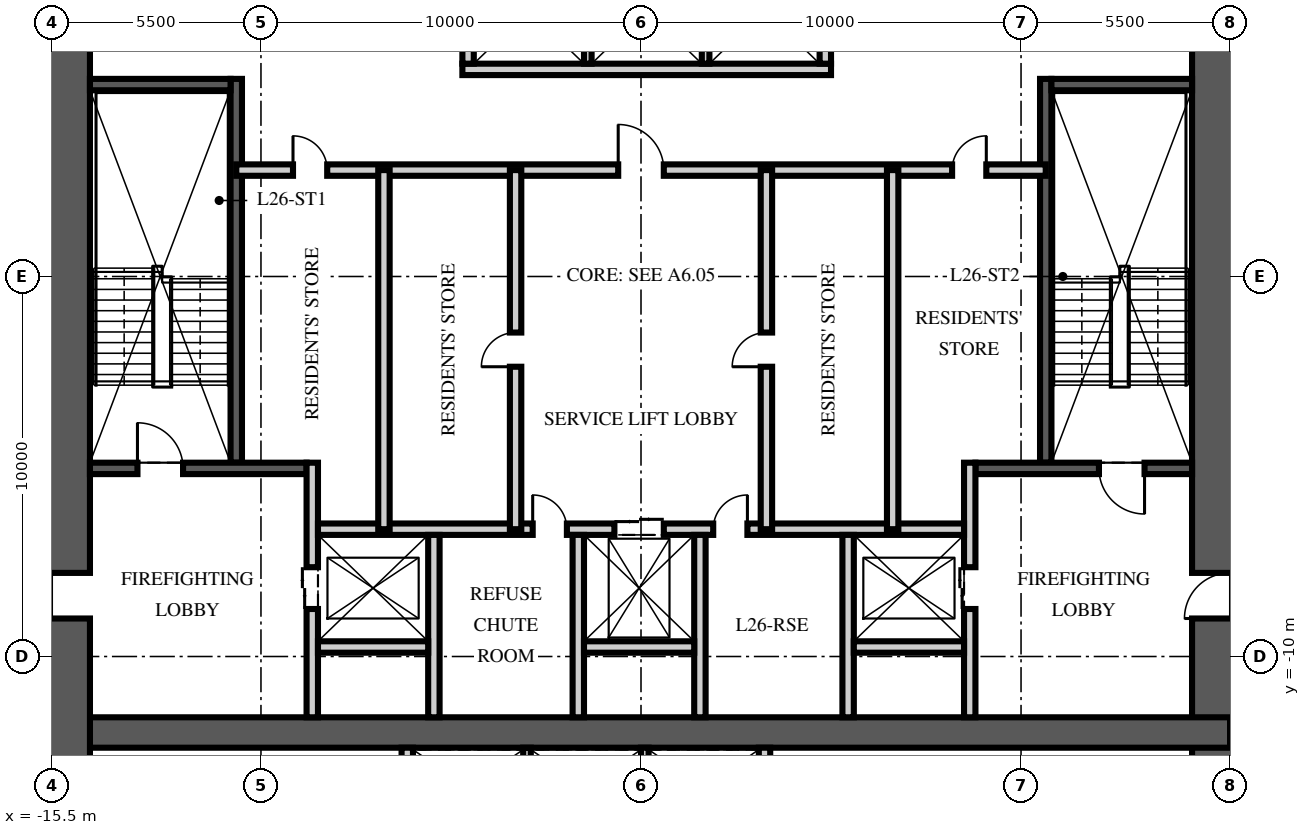
"""IFC4 building model, lengths in metres.
Left out: names, types, materials, properties, quantities, classifications, styles, units other than length and angle.
Written with IfcOpenShell. Run it as: python <this file> out.ifc"""

import sys

from ifc_helpers import new_model, si_unit, direction, frame, frame_2d, origin, place, context, subcontext, project, spatial, rectangle, extrude, element, fill, save


model = new_model("IFC4")
c1 = context("Model", 3, precision=1e-05, world=origin(), true_north=direction((0.0, 1.0)))
c2 = subcontext(c1, "Body", "Model", "MODEL_VIEW")
j1 = project(units=[si_unit("LENGTHUNIT", "METRE"), si_unit("PLANEANGLEUNIT", "RADIAN")], contexts=[c1])
p1 = place(None, origin())
s1 = spatial("IfcSite", under=j1, at=p1, CompositionType="ELEMENT")
p2 = place(p1, origin())
s2 = spatial("IfcBuilding", under=s1, at=p2, CompositionType="ELEMENT")
p3 = place(p2, frame((0.0, 0.0, 107.25)))
s3 = spatial("IfcBuildingStorey", under=s2, at=p3, CompositionType="ELEMENT", Elevation=107.25)
p4 = place(p3, frame((15.5, -15.5, -0.25), z_axis=(0.0, 0.0, 1.0), x_axis=(0.0, 1.0, 0.0)))
e1 = element("IfcWall", 1, at=p4, inside=s3, PredefinedType="SHEAR", context=c2, shape_type="SweptSolid", body=[
    extrude(rectangle(XDim=31.0, YDim=2.0, at=frame_2d((15.5, 0.0))), origin(), (0.0, 0.0, 1.0), 3.75),
])
p5 = place(p4, frame((6.5, 0.0, 0.25)))
e2 = element("IfcOpeningElement", 2, at=p5, cuts=e1, PredefinedType="OPENING", context=c2, shape_type="SweptSolid", body=[
    extrude(rectangle(XDim=1.2, YDim=2.1, at=frame_2d((0.6, 1.05))), frame((0.0, 1.01, 0.0), z_axis=(0.0, -1.0, 0.0), x_axis=(1.0, 0.0, 0.0)), (0.0, 0.0, 1.0), 2.02),
])
p6 = place(p4, frame((23.0, 0.0, 0.25)))
e3 = element("IfcOpeningElement", 3, at=p6, cuts=e1, PredefinedType="OPENING", context=c2, shape_type="SweptSolid", body=[
    extrude(rectangle(XDim=1.8, YDim=2.1, at=frame_2d((0.9, 1.05))), frame((0.0, 1.01, 0.0), z_axis=(0.0, -1.0, 0.0), x_axis=(1.0, 0.0, 0.0)), (0.0, 0.0, 1.0), 2.02),
])
p7 = place(p3, frame((-15.5, -12.0, -0.25), z_axis=(0.0, 0.0, 1.0), x_axis=(1.0, 0.0, 0.0)))
e4 = element("IfcWall", 4, at=p7, inside=s3, PredefinedType="SHEAR", context=c2, shape_type="SweptSolid", body=[
    extrude(rectangle(XDim=31.0, YDim=0.8, at=frame_2d((15.5, 0.0))), origin(), (0.0, 0.0, 1.0), 3.75),
])
p8 = place(p3, frame((-15.5, -15.5, -0.25), z_axis=(0.0, 0.0, 1.0), x_axis=(0.0, 1.0, 0.0)))
e5 = element("IfcWall", 5, at=p8, inside=s3, PredefinedType="SHEAR", context=c2, shape_type="SweptSolid", body=[
    extrude(rectangle(XDim=31.0, YDim=2.0, at=frame_2d((15.5, 0.0))), origin(), (0.0, 0.0, 1.0), 3.75),
])
p9 = place(p8, frame((6.5, 0.0, 0.25)))
e6 = element("IfcOpeningElement", 6, at=p9, cuts=e5, PredefinedType="OPENING", context=c2, shape_type="SweptSolid", body=[
    extrude(rectangle(XDim=1.2, YDim=2.1, at=frame_2d((0.6, 1.05))), frame((0.0, 1.01, 0.0), z_axis=(0.0, -1.0, 0.0), x_axis=(1.0, 0.0, 0.0)), (0.0, 0.0, 1.0), 2.02),
])
p10 = place(p8, frame((23.0, 0.0, 0.25)))
e7 = element("IfcOpeningElement", 7, at=p10, cuts=e5, PredefinedType="OPENING", context=c2, shape_type="SweptSolid", body=[
    extrude(rectangle(XDim=1.8, YDim=2.1, at=frame_2d((0.9, 1.05))), frame((0.0, 1.01, 0.0), z_axis=(0.0, -1.0, 0.0), x_axis=(1.0, 0.0, 0.0)), (0.0, 0.0, 1.0), 2.02),
])
p11 = place(p3, frame((-10.65, -4.9, 0.0), z_axis=(0.0, 0.0, 1.0), x_axis=(0.0, 1.0, 0.0)))
e8 = element("IfcWall", 8, at=p11, inside=s3, PredefinedType="SOLIDWALL", context=c2, shape_type="SweptSolid", body=[
    extrude(rectangle(XDim=10.1, YDim=0.3, at=frame_2d((5.05, 0.0))), origin(), (0.0, 0.0, 1.0), 3.5),
])
p12 = place(p3, frame((-14.5, -5.05, 0.0), z_axis=(0.0, 0.0, 1.0), x_axis=(1.0, 0.0, 0.0)))
e9 = element("IfcWall", 9, at=p12, inside=s3, PredefinedType="SOLIDWALL", context=c2, shape_type="SweptSolid", body=[
    extrude(rectangle(XDim=5.7, YDim=0.3, at=frame_2d((2.85, 0.0))), origin(), (0.0, 0.0, 1.0), 3.5),
])
p13 = place(p12, frame((1.25, 0.0, 0.0)))
e10 = element("IfcOpeningElement", 10, at=p13, cuts=e9, PredefinedType="OPENING", context=c2, shape_type="SweptSolid", body=[
    extrude(rectangle(XDim=1.2, YDim=2.1, at=frame_2d((0.6, 1.05))), frame((0.0, 0.16, 0.0), z_axis=(0.0, -1.0, 0.0), x_axis=(1.0, 0.0, 0.0)), (0.0, 0.0, 1.0), 0.32),
])
p14 = place(p3, frame((-14.5, 5.05, 0.0), z_axis=(0.0, 0.0, 1.0), x_axis=(1.0, 0.0, 0.0)))
e11 = element("IfcWall", 11, at=p14, inside=s3, PredefinedType="SOLIDWALL", context=c2, shape_type="SweptSolid", body=[
    extrude(rectangle(XDim=3.7, YDim=0.3, at=frame_2d((1.85, 0.0))), origin(), (0.0, 0.0, 1.0), 3.5),
])
p15 = place(p3, frame((-8.65, -11.6, 0.0), z_axis=(0.0, 0.0, 1.0), x_axis=(0.0, 1.0, 0.0)))
e12 = element("IfcWall", 12, at=p15, inside=s3, PredefinedType="PARTITIONING", context=c2, shape_type="SweptSolid", body=[
    extrude(rectangle(XDim=6.7, YDim=0.3, at=frame_2d((3.35, 0.0))), origin(), (0.0, 0.0, 1.0), 3.5),
])
p16 = place(p15, frame((2.85, 0.0, 0.0)))
e13 = element("IfcOpeningElement", 13, at=p16, cuts=e12, PredefinedType="OPENING", context=c2, shape_type="SweptSolid", body=[
    extrude(rectangle(XDim=1.1, YDim=2.1, at=frame_2d((0.55, 1.05))), frame((0.0, 0.16, 0.0), z_axis=(0.0, -1.0, 0.0), x_axis=(1.0, 0.0, 0.0)), (0.0, 0.0, 1.0), 0.32),
])
p17 = place(p3, frame((10.65, -4.9, 0.0), z_axis=(0.0, 0.0, 1.0), x_axis=(0.0, 1.0, 0.0)))
e14 = element("IfcWall", 14, at=p17, inside=s3, PredefinedType="SOLIDWALL", context=c2, shape_type="SweptSolid", body=[
    extrude(rectangle(XDim=10.1, YDim=0.3, at=frame_2d((5.05, 0.0))), origin(), (0.0, 0.0, 1.0), 3.5),
])
p18 = place(p3, frame((14.5, -5.05, 0.0), z_axis=(0.0, 0.0, 1.0), x_axis=(-1.0, 0.0, 0.0)))
e15 = element("IfcWall", 15, at=p18, inside=s3, PredefinedType="SOLIDWALL", context=c2, shape_type="SweptSolid", body=[
    extrude(rectangle(XDim=5.7, YDim=0.3, at=frame_2d((2.85, 0.0))), origin(), (0.0, 0.0, 1.0), 3.5),
])
p19 = place(p18, frame((1.25, 0.0, 0.0)))
e16 = element("IfcOpeningElement", 16, at=p19, cuts=e15, PredefinedType="OPENING", context=c2, shape_type="SweptSolid", body=[
    extrude(rectangle(XDim=1.2, YDim=2.1, at=frame_2d((0.6, 1.05))), frame((0.0, 0.16, 0.0), z_axis=(0.0, -1.0, 0.0), x_axis=(1.0, 0.0, 0.0)), (0.0, 0.0, 1.0), 0.32),
])
p20 = place(p3, frame((14.5, 5.05, 0.0), z_axis=(0.0, 0.0, 1.0), x_axis=(-1.0, 0.0, 0.0)))
e17 = element("IfcWall", 17, at=p20, inside=s3, PredefinedType="SOLIDWALL", context=c2, shape_type="SweptSolid", body=[
    extrude(rectangle(XDim=3.7, YDim=0.3, at=frame_2d((1.85, 0.0))), origin(), (0.0, 0.0, 1.0), 3.5),
])
p21 = place(p3, frame((8.65, -11.6, 0.0), z_axis=(0.0, 0.0, 1.0), x_axis=(0.0, 1.0, 0.0)))
e18 = element("IfcWall", 18, at=p21, inside=s3, PredefinedType="PARTITIONING", context=c2, shape_type="SweptSolid", body=[
    extrude(rectangle(XDim=6.7, YDim=0.3, at=frame_2d((3.35, 0.0))), origin(), (0.0, 0.0, 1.0), 3.5),
])
p22 = place(p21, frame((2.85, 0.0, 0.0)))
e19 = element("IfcOpeningElement", 19, at=p22, cuts=e18, PredefinedType="OPENING", context=c2, shape_type="SweptSolid", body=[
    extrude(rectangle(XDim=1.1, YDim=2.1, at=frame_2d((0.55, 1.05))), frame((0.0, 0.16, 0.0), z_axis=(0.0, -1.0, 0.0), x_axis=(1.0, 0.0, 0.0)), (0.0, 0.0, 1.0), 0.32),
])
p23 = place(p3, frame((-8.5, -6.65, 0.0), z_axis=(0.0, 0.0, 1.0), x_axis=(1.0, 0.0, 0.0)))
e20 = element("IfcWall", 20, at=p23, inside=s3, PredefinedType="PARTITIONING", context=c2, shape_type="SweptSolid", body=[
    extrude(rectangle(XDim=17.0, YDim=0.3, at=frame_2d((8.5, 0.0))), origin(), (0.0, 0.0, 1.0), 3.5),
])
p24 = place(p23, frame((7.8, 0.0, 0.0)))
e21 = element("IfcOpeningElement", 21, at=p24, cuts=e20, PredefinedType="OPENING", context=c2, shape_type="SweptSolid", body=[
    extrude(rectangle(XDim=1.3, YDim=2.4, at=frame_2d((0.65, 1.2))), frame((0.0, 0.16, 0.0), z_axis=(0.0, -1.0, 0.0), x_axis=(1.0, 0.0, 0.0)), (0.0, 0.0, 1.0), 0.32),
])
p25 = place(p23, frame((5.65, 0.0, 0.0)))
e22 = element("IfcOpeningElement", 22, at=p25, cuts=e20, PredefinedType="OPENING", context=c2, shape_type="SweptSolid", body=[
    extrude(rectangle(XDim=0.9, YDim=2.1, at=frame_2d((0.45, 1.05))), frame((0.0, 0.16, 0.0), z_axis=(0.0, -1.0, 0.0), x_axis=(1.0, 0.0, 0.0)), (0.0, 0.0, 1.0), 0.32),
])
p26 = place(p23, frame((10.4, 0.0, 0.0)))
e23 = element("IfcOpeningElement", 23, at=p26, cuts=e20, PredefinedType="OPENING", context=c2, shape_type="SweptSolid", body=[
    extrude(rectangle(XDim=0.9, YDim=2.1, at=frame_2d((0.45, 1.05))), frame((0.0, 0.16, 0.0), z_axis=(0.0, -1.0, 0.0), x_axis=(1.0, 0.0, 0.0)), (0.0, 0.0, 1.0), 0.32),
])
for number, where, z_axis, x_axis in (
    (24, (-5.45, -11.6, 0.0), (0.0, 0.0, 1.0), (0.0, 1.0, 0.0)),
    (25, (-1.65, -11.6, 0.0), (0.0, 0.0, 1.0), (0.0, 1.0, 0.0)),
    (26, (1.55, -11.6, 0.0), (0.0, 0.0, 1.0), (0.0, 1.0, 0.0)),
    (27, (5.45, -11.6, 0.0), (0.0, 0.0, 1.0), (0.0, 1.0, 0.0)),
):
    element("IfcWall", number, at=place(p3, frame(where, z_axis=z_axis, x_axis=x_axis)), inside=s3, PredefinedType="PARTITIONING", context=c2, shape_type="SweptSolid", body=[
        extrude(rectangle(XDim=4.8, YDim=0.3, at=frame_2d((2.4, 0.0))), origin(), (0.0, 0.0, 1.0), 3.5),
    ])
for number, where, z_axis, x_axis in (
    (28, (-8.5, -9.75, 0.0), (0.0, 0.0, 1.0), (1.0, 0.0, 0.0)),
    (29, (-1.5, -9.75, 0.0), (0.0, 0.0, 1.0), (1.0, 0.0, 0.0)),
    (30, (5.6, -9.75, 0.0), (0.0, 0.0, 1.0), (1.0, 0.0, 0.0)),
):
    element("IfcWall", number, at=place(p3, frame(where, z_axis=z_axis, x_axis=x_axis)), inside=s3, PredefinedType="PARTITIONING", context=c2, shape_type="SweptSolid", body=[
        extrude(rectangle(XDim=2.9, YDim=0.3, at=frame_2d((1.45, 0.0))), origin(), (0.0, 0.0, 1.0), 3.5),
    ])
p27 = place(p3, frame((-4.7, 5.45, 0.0), z_axis=(0.0, 0.0, 1.0), x_axis=(1.0, 0.0, 0.0)))
e31 = element("IfcWall", 31, at=p27, inside=s3, PredefinedType="PARTITIONING", context=c2, shape_type="SweptSolid", body=[
    extrude(rectangle(XDim=9.7, YDim=0.3, at=frame_2d((4.85, 0.0))), origin(), (0.0, 0.0, 1.0), 3.5),
])
for number, where, z_axis, x_axis in (
    (32, (-4.55, 5.6, 0.0), (0.0, 0.0, 1.0), (0.0, 1.0, 0.0)),
    (33, (4.85, 5.6, 0.0), (0.0, 0.0, 1.0), (0.0, 1.0, 0.0)),
):
    element("IfcWall", number, at=place(p3, frame(where, z_axis=z_axis, x_axis=x_axis)), inside=s3, PredefinedType="PARTITIONING", context=c2, shape_type="SweptSolid", body=[
        extrude(rectangle(XDim=2.8, YDim=0.3, at=frame_2d((1.4, 0.0))), origin(), (0.0, 0.0, 1.0), 3.5),
    ])
for number, where, z_axis, x_axis in (
    (34, (-1.4, 5.6, 0.0), (0.0, 0.0, 1.0), (0.0, 1.0, 0.0)),
    (35, (1.7, 5.6, 0.0), (0.0, 0.0, 1.0), (0.0, 1.0, 0.0)),
):
    element("IfcWall", number, at=place(p3, frame(where, z_axis=z_axis, x_axis=x_axis)), inside=s3, PredefinedType="PARTITIONING", context=c2, shape_type="SweptSolid", body=[
        extrude(rectangle(XDim=2.8, YDim=0.2, at=frame_2d((1.4, 0.0))), origin(), (0.0, 0.0, 1.0), 3.5),
    ])
for number, where, z_axis, x_axis in (
    (36, (-6.15, -14.5, 0.0), (0.0, 0.0, 1.0), (0.0, 1.0, 0.0)),
    (37, (3.25, -14.5, 0.0), (0.0, 0.0, 1.0), (0.0, 1.0, 0.0)),
):
    element("IfcWall", number, at=place(p3, frame(where, z_axis=z_axis, x_axis=x_axis)), inside=s3, PredefinedType="PARTITIONING", context=c2, shape_type="SweptSolid", body=[
        extrude(rectangle(XDim=2.1, YDim=0.3, at=frame_2d((1.05, 0.0))), origin(), (0.0, 0.0, 1.0), 3.5),
    ])
for number, where, z_axis, x_axis in (
    (38, (-3.0, -14.5, 0.0), (0.0, 0.0, 1.0), (0.0, 1.0, 0.0)),
    (39, (0.1, -14.5, 0.0), (0.0, 0.0, 1.0), (0.0, 1.0, 0.0)),
):
    element("IfcWall", number, at=place(p3, frame(where, z_axis=z_axis, x_axis=x_axis)), inside=s3, PredefinedType="PARTITIONING", context=c2, shape_type="SweptSolid", body=[
        extrude(rectangle(XDim=2.1, YDim=0.2, at=frame_2d((1.05, 0.0))), origin(), (0.0, 0.0, 1.0), 3.5),
    ])
p28 = place(p3, frame((-10.65, 2.8, 0.0), z_axis=(0.0, 0.0, 1.0), x_axis=(1.0, 0.0, 0.0)))
e40 = element("IfcWall", 40, at=p28, inside=s3, PredefinedType="PARTITIONING", context=c2, shape_type="SweptSolid", body=[
    extrude(rectangle(XDim=21.3, YDim=0.3, at=frame_2d((10.65, 0.0))), origin(), (0.0, 0.0, 1.0), 3.5),
])
p29 = place(p28, frame((10.05, 0.0, 0.0)))
e41 = element("IfcOpeningElement", 41, at=p29, cuts=e40, PredefinedType="OPENING", context=c2, shape_type="SweptSolid", body=[
    extrude(rectangle(XDim=1.2, YDim=2.1, at=frame_2d((0.6, 1.05))), frame((0.0, 0.16, 0.0), z_axis=(0.0, -1.0, 0.0), x_axis=(1.0, 0.0, 0.0)), (0.0, 0.0, 1.0), 0.32),
])
p30 = place(p28, frame((1.493, 0.0, 0.0)))
e42 = element("IfcOpeningElement", 42, at=p30, cuts=e40, PredefinedType="OPENING", context=c2, shape_type="SweptSolid", body=[
    extrude(rectangle(XDim=0.9, YDim=2.1, at=frame_2d((0.45, 1.05))), frame((0.0, 0.16, 0.0), z_axis=(0.0, -1.0, 0.0), x_axis=(1.0, 0.0, 0.0)), (0.0, 0.0, 1.0), 0.32),
])
p31 = place(p28, frame((18.836, 0.0, 0.0)))
e43 = element("IfcOpeningElement", 43, at=p31, cuts=e40, PredefinedType="OPENING", context=c2, shape_type="SweptSolid", body=[
    extrude(rectangle(XDim=0.9, YDim=2.1, at=frame_2d((0.45, 1.05))), frame((0.0, 0.16, 0.0), z_axis=(0.0, -1.0, 0.0), x_axis=(1.0, 0.0, 0.0)), (0.0, 0.0, 1.0), 0.32),
])
p32 = place(p3, frame((-3.3, -6.65, 0.0), z_axis=(0.0, 0.0, 1.0), x_axis=(0.0, 1.0, 0.0)))
e44 = element("IfcWall", 44, at=p32, inside=s3, PredefinedType="PARTITIONING", context=c2, shape_type="SweptSolid", body=[
    extrude(rectangle(XDim=9.45, YDim=0.3, at=frame_2d((4.725, 0.0))), origin(), (0.0, 0.0, 1.0), 3.5),
])
p33 = place(p32, frame((4.275, 0.0, 0.0)))
e45 = element("IfcOpeningElement", 45, at=p33, cuts=e44, PredefinedType="OPENING", context=c2, shape_type="SweptSolid", body=[
    extrude(rectangle(XDim=0.9, YDim=2.1, at=frame_2d((0.45, 1.05))), frame((0.0, 0.16, 0.0), z_axis=(0.0, -1.0, 0.0), x_axis=(1.0, 0.0, 0.0)), (0.0, 0.0, 1.0), 0.32),
])
p34 = place(p3, frame((3.3, -6.65, 0.0), z_axis=(0.0, 0.0, 1.0), x_axis=(0.0, 1.0, 0.0)))
e46 = element("IfcWall", 46, at=p34, inside=s3, PredefinedType="PARTITIONING", context=c2, shape_type="SweptSolid", body=[
    extrude(rectangle(XDim=9.45, YDim=0.3, at=frame_2d((4.725, 0.0))), origin(), (0.0, 0.0, 1.0), 3.5),
])
p35 = place(p34, frame((4.275, 0.0, 0.0)))
e47 = element("IfcOpeningElement", 47, at=p35, cuts=e46, PredefinedType="OPENING", context=c2, shape_type="SweptSolid", body=[
    extrude(rectangle(XDim=0.9, YDim=2.1, at=frame_2d((0.45, 1.05))), frame((0.0, 0.16, 0.0), z_axis=(0.0, -1.0, 0.0), x_axis=(1.0, 0.0, 0.0)), (0.0, 0.0, 1.0), 0.32),
])
for number, where, z_axis, x_axis in (
    (48, (-6.764, -6.65, 0.0), (0.0, 0.0, 1.0), (0.0, 1.0, 0.0)),
    (49, (6.622, -6.65, 0.0), (0.0, 0.0, 1.0), (0.0, 1.0, 0.0)),
):
    element("IfcWall", number, at=place(p3, frame(where, z_axis=z_axis, x_axis=x_axis)), inside=s3, PredefinedType="PARTITIONING", context=c2, shape_type="SweptSolid", body=[
        extrude(rectangle(XDim=9.45, YDim=0.3, at=frame_2d((4.725, 0.0))), origin(), (0.0, 0.0, 1.0), 3.5),
    ])
p36 = place(p13, origin())
e50 = element("IfcDoor", 50, at=p36, inside=s3, OperationType="SINGLE_SWING_LEFT", PredefinedType="DOOR", context=c2, shape_type="SweptSolid", body=[
    extrude(rectangle(XDim=1.2, YDim=2.1, at=frame_2d((0.6, 1.05))), frame((0.0, 0.025, 0.0), z_axis=(0.0, -1.0, 0.0), x_axis=(1.0, 0.0, 0.0)), (0.0, 0.0, 1.0), 0.05),
])
fill(e10, e50)
p37 = place(p9, origin())
e51 = element("IfcDoor", 51, at=p37, inside=s3, OperationType="SINGLE_SWING_LEFT", PredefinedType="DOOR", context=c2, shape_type="SweptSolid", body=[
    extrude(rectangle(XDim=1.2, YDim=2.1, at=frame_2d((0.6, 1.05))), frame((0.0, 0.025, 0.0), z_axis=(0.0, -1.0, 0.0), x_axis=(1.0, 0.0, 0.0)), (0.0, 0.0, 1.0), 0.05),
])
fill(e6, e51)
p38 = place(p19, origin())
e52 = element("IfcDoor", 52, at=p38, inside=s3, OperationType="SINGLE_SWING_LEFT", PredefinedType="DOOR", context=c2, shape_type="SweptSolid", body=[
    extrude(rectangle(XDim=1.2, YDim=2.1, at=frame_2d((0.6, 1.05))), frame((0.0, 0.025, 0.0), z_axis=(0.0, -1.0, 0.0), x_axis=(1.0, 0.0, 0.0)), (0.0, 0.0, 1.0), 0.05),
])
fill(e16, e52)
p39 = place(p5, origin())
e53 = element("IfcDoor", 53, at=p39, inside=s3, OperationType="SINGLE_SWING_LEFT", PredefinedType="DOOR", context=c2, shape_type="SweptSolid", body=[
    extrude(rectangle(XDim=1.2, YDim=2.1, at=frame_2d((0.6, 1.05))), frame((0.0, 0.025, 0.0), z_axis=(0.0, -1.0, 0.0), x_axis=(1.0, 0.0, 0.0)), (0.0, 0.0, 1.0), 0.05),
])
fill(e2, e53)
p40 = place(p16, origin())
e54 = element("IfcDoor", 54, at=p40, inside=s3, OperationType="DOUBLE_DOOR_SLIDING", PredefinedType="DOOR", context=c2, shape_type="SweptSolid", body=[
    extrude(rectangle(XDim=1.1, YDim=2.1, at=frame_2d((0.55, 1.05))), frame((0.0, 0.025, 0.0), z_axis=(0.0, -1.0, 0.0), x_axis=(1.0, 0.0, 0.0)), (0.0, 0.0, 1.0), 0.05),
])
fill(e13, e54)
p41 = place(p22, origin())
e55 = element("IfcDoor", 55, at=p41, inside=s3, OperationType="DOUBLE_DOOR_SLIDING", PredefinedType="DOOR", context=c2, shape_type="SweptSolid", body=[
    extrude(rectangle(XDim=1.1, YDim=2.1, at=frame_2d((0.55, 1.05))), frame((0.0, 0.025, 0.0), z_axis=(0.0, -1.0, 0.0), x_axis=(1.0, 0.0, 0.0)), (0.0, 0.0, 1.0), 0.05),
])
fill(e19, e55)
p42 = place(p24, origin())
e56 = element("IfcDoor", 56, at=p42, inside=s3, OperationType="DOUBLE_DOOR_SLIDING", PredefinedType="DOOR", context=c2, shape_type="SweptSolid", body=[
    extrude(rectangle(XDim=1.3, YDim=2.4, at=frame_2d((0.65, 1.2))), frame((0.0, 0.025, 0.0), z_axis=(0.0, -1.0, 0.0), x_axis=(1.0, 0.0, 0.0)), (0.0, 0.0, 1.0), 0.05),
])
fill(e21, e56)
p43 = place(p29, origin())
e57 = element("IfcDoor", 57, at=p43, inside=s3, OperationType="SINGLE_SWING_LEFT", PredefinedType="DOOR", context=c2, shape_type="SweptSolid", body=[
    extrude(rectangle(XDim=1.2, YDim=2.1, at=frame_2d((0.6, 1.05))), frame((0.0, 0.025, 0.0), z_axis=(0.0, -1.0, 0.0), x_axis=(1.0, 0.0, 0.0)), (0.0, 0.0, 1.0), 0.05),
])
fill(e41, e57)
p44 = place(p25, origin())
e58 = element("IfcDoor", 58, at=p44, inside=s3, OperationType="SINGLE_SWING_LEFT", PredefinedType="DOOR", context=c2, shape_type="SweptSolid", body=[
    extrude(rectangle(XDim=0.9, YDim=2.1, at=frame_2d((0.45, 1.05))), frame((0.0, 0.025, 0.0), z_axis=(0.0, -1.0, 0.0), x_axis=(1.0, 0.0, 0.0)), (0.0, 0.0, 1.0), 0.05),
])
fill(e22, e58)
p45 = place(p26, origin())
e59 = element("IfcDoor", 59, at=p45, inside=s3, OperationType="SINGLE_SWING_RIGHT", PredefinedType="DOOR", context=c2, shape_type="SweptSolid", body=[
    extrude(rectangle(XDim=0.9, YDim=2.1, at=frame_2d((0.45, 1.05))), frame((0.0, 0.025, 0.0), z_axis=(0.0, -1.0, 0.0), x_axis=(1.0, 0.0, 0.0)), (0.0, 0.0, 1.0), 0.05),
])
fill(e23, e59)
p46 = place(p33, origin())
e60 = element("IfcDoor", 60, at=p46, inside=s3, OperationType="SINGLE_SWING_LEFT", PredefinedType="DOOR", context=c2, shape_type="SweptSolid", body=[
    extrude(rectangle(XDim=0.9, YDim=2.1, at=frame_2d((0.45, 1.05))), frame((0.0, 0.025, 0.0), z_axis=(0.0, -1.0, 0.0), x_axis=(1.0, 0.0, 0.0)), (0.0, 0.0, 1.0), 0.05),
])
fill(e45, e60)
p47 = place(p30, origin())
e61 = element("IfcDoor", 61, at=p47, inside=s3, OperationType="SINGLE_SWING_LEFT", PredefinedType="DOOR", context=c2, shape_type="SweptSolid", body=[
    extrude(rectangle(XDim=0.9, YDim=2.1, at=frame_2d((0.45, 1.05))), frame((0.0, 0.025, 0.0), z_axis=(0.0, -1.0, 0.0), x_axis=(1.0, 0.0, 0.0)), (0.0, 0.0, 1.0), 0.05),
])
fill(e42, e61)
p48 = place(p35, origin())
e62 = element("IfcDoor", 62, at=p48, inside=s3, OperationType="SINGLE_SWING_LEFT", PredefinedType="DOOR", context=c2, shape_type="SweptSolid", body=[
    extrude(rectangle(XDim=0.9, YDim=2.1, at=frame_2d((0.45, 1.05))), frame((0.0, 0.025, 0.0), z_axis=(0.0, -1.0, 0.0), x_axis=(1.0, 0.0, 0.0)), (0.0, 0.0, 1.0), 0.05),
])
fill(e47, e62)
p49 = place(p31, origin())
e63 = element("IfcDoor", 63, at=p49, inside=s3, OperationType="SINGLE_SWING_RIGHT", PredefinedType="DOOR", context=c2, shape_type="SweptSolid", body=[
    extrude(rectangle(XDim=0.9, YDim=2.1, at=frame_2d((0.45, 1.05))), frame((0.0, 0.025, 0.0), z_axis=(0.0, -1.0, 0.0), x_axis=(1.0, 0.0, 0.0)), (0.0, 0.0, 1.0), 0.05),
])
fill(e43, e63)
save(model, sys.argv[1])
